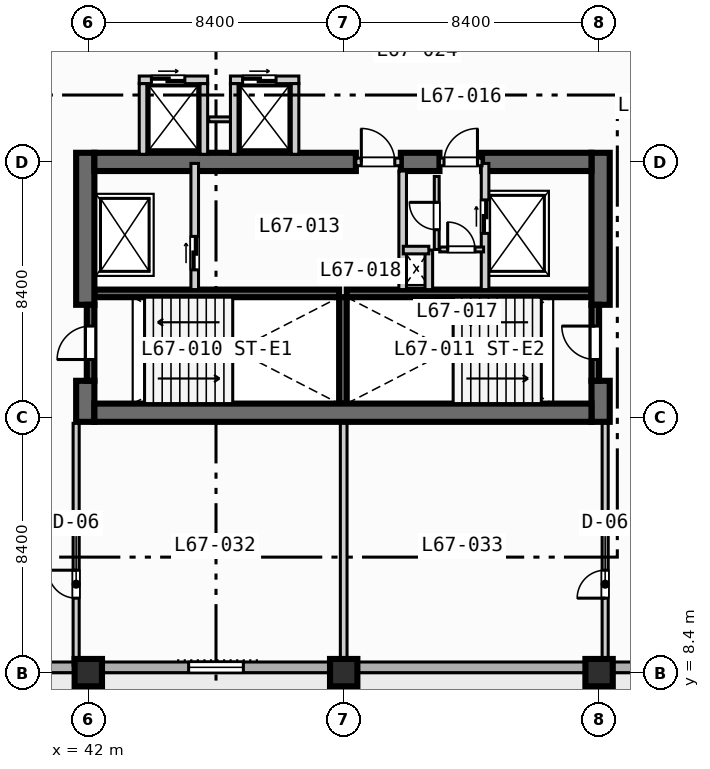
"""IFC4 building model, lengths in metres.
Left out: names, types, materials, properties, quantities, classifications, styles, units other than length and angle.
Written with IfcOpenShell. Run it as: python <this file> out.ifc"""

import sys

from ifc_helpers import new_model, si_unit, direction, frame, frame_2d, origin, origin_2d, place, context, subcontext, project, spatial, rectangle, extrude, element, fill, save


model = new_model("IFC4")
c1 = context("Model", 3, precision=1e-05, world=origin(), true_north=direction((0.0, 1.0)))
c2 = subcontext(c1, "Body", "Model", "MODEL_VIEW")
j1 = project(units=[si_unit("LENGTHUNIT", "METRE"), si_unit("PLANEANGLEUNIT", "RADIAN")], contexts=[c1])
p1 = place(None, origin())
s1 = spatial("IfcSite", under=j1, at=p1, CompositionType="ELEMENT")
p2 = place(p1, origin())
s2 = spatial("IfcBuilding", under=s1, at=p2, CompositionType="ELEMENT")
p3 = place(p2, frame((0.0, 0.0, 271.2)))
s3 = spatial("IfcBuildingStorey", under=s2, at=p3, CompositionType="ELEMENT", Elevation=271.2)
for number, where, z_axis, x_axis in (
    (1, (42.2, 20.875, 0.0), (0.0, 0.0, 1.0), (1.0, 0.0, 0.0)),
    (2, (50.5, 20.875, 0.0), (0.0, 0.0, 1.0), (1.0, 0.0, 0.0)),
):
    element("IfcWall", number, at=place(p3, frame(where, z_axis=z_axis, x_axis=x_axis)), inside=s3, PredefinedType="SOLIDWALL", context=c2, shape_type="SweptSolid", body=[
        extrude(rectangle(XDim=8.05, YDim=0.25, at=frame_2d((4.025, 0.0))), origin(), (0.0, 0.0, 1.0), 3.47),
    ])
p4 = place(p3, frame((50.375, 17.25, 0.0), z_axis=(0.0, 0.0, 1.0), x_axis=(0.0, 1.0, 0.0)))
e3 = element("IfcWall", 3, at=p4, inside=s3, PredefinedType="SOLIDWALL", context=c2, shape_type="SweptSolid", body=[
    extrude(rectangle(XDim=3.5, YDim=0.25, at=frame_2d((1.75, 0.0))), origin(), (0.0, 0.0, 1.0), 3.47),
])
p5 = place(p3, frame((41.9, 16.65, 0.0), z_axis=(0.0, 0.0, 1.0), x_axis=(0.0, 1.0, 0.0)))
e4 = element("IfcWall", 4, at=p5, inside=s3, PredefinedType="SHEAR", context=c2, shape_type="SweptSolid", body=[
    extrude(rectangle(XDim=1.35, YDim=0.6, at=frame_2d((0.675, 0.0))), origin(), (0.0, 0.0, 1.0), 3.47),
])
p6 = place(p3, frame((41.9, 20.5, 0.0), z_axis=(0.0, 0.0, 1.0), x_axis=(0.0, 1.0, 0.0)))
e5 = element("IfcWall", 5, at=p6, inside=s3, PredefinedType="SHEAR", context=c2, shape_type="SweptSolid", body=[
    extrude(rectangle(XDim=5.0, YDim=0.6, at=frame_2d((2.5, 0.0))), origin(), (0.0, 0.0, 1.0), 3.47),
])
p7 = place(p3, frame((58.85, 16.65, 0.0), z_axis=(0.0, 0.0, 1.0), x_axis=(0.0, 1.0, 0.0)))
e6 = element("IfcWall", 6, at=p7, inside=s3, PredefinedType="SHEAR", context=c2, shape_type="SweptSolid", body=[
    extrude(rectangle(XDim=1.35, YDim=0.6, at=frame_2d((0.675, 0.0))), origin(), (0.0, 0.0, 1.0), 3.47),
])
p8 = place(p3, frame((58.85, 20.5, 0.0), z_axis=(0.0, 0.0, 1.0), x_axis=(0.0, 1.0, 0.0)))
e7 = element("IfcWall", 7, at=p8, inside=s3, PredefinedType="SHEAR", context=c2, shape_type="SweptSolid", body=[
    extrude(rectangle(XDim=5.0, YDim=0.6, at=frame_2d((2.5, 0.0))), origin(), (0.0, 0.0, 1.0), 3.47),
])
p9 = place(p3, frame((42.2, 16.95, 0.0), z_axis=(0.0, 0.0, 1.0), x_axis=(1.0, 0.0, 0.0)))
e8 = element("IfcWall", 8, at=p9, inside=s3, PredefinedType="SHEAR", context=c2, shape_type="SweptSolid", body=[
    extrude(rectangle(XDim=16.35, YDim=0.6, at=frame_2d((8.175, 0.0))), origin(), (0.0, 0.0, 1.0), 3.47),
])
p10 = place(p3, frame((42.2, 25.2, 0.0), z_axis=(0.0, 0.0, 1.0), x_axis=(1.0, 0.0, 0.0)))
e9 = element("IfcWall", 9, at=p10, inside=s3, PredefinedType="SHEAR", context=c2, shape_type="SweptSolid", body=[
    extrude(rectangle(XDim=8.6, YDim=0.6, at=frame_2d((4.3, 0.0))), origin(), (0.0, 0.0, 1.0), 3.47),
])
p11 = place(p3, frame((52.28, 25.2, 0.0), z_axis=(0.0, 0.0, 1.0), x_axis=(1.0, 0.0, 0.0)))
e10 = element("IfcWall", 10, at=p11, inside=s3, PredefinedType="SHEAR", context=c2, shape_type="SweptSolid", body=[
    extrude(rectangle(XDim=1.27, YDim=0.6, at=frame_2d((0.635, 0.0))), origin(), (0.0, 0.0, 1.0), 3.47),
])
p12 = place(p3, frame((54.95, 25.2, 0.0), z_axis=(0.0, 0.0, 1.0), x_axis=(1.0, 0.0, 0.0)))
e11 = element("IfcWall", 11, at=p12, inside=s3, PredefinedType="SHEAR", context=c2, shape_type="SweptSolid", body=[
    extrude(rectangle(XDim=3.6, YDim=0.6, at=frame_2d((1.8, 0.0))), origin(), (0.0, 0.0, 1.0), 3.47),
])
for number, where, z_axis, x_axis in (
    (12, (42.0, 8.4, 0.0), (0.0, 0.0, 1.0), (1.0, 0.0, 0.0)),
    (13, (50.4, 8.4, 0.0), (0.0, 0.0, 1.0), (1.0, 0.0, 0.0)),
    (14, (58.8, 8.4, 0.0), (0.0, 0.0, 1.0), (1.0, 0.0, 0.0)),
):
    element("IfcColumn", number, at=place(p3, frame(where, z_axis=z_axis, x_axis=x_axis)), inside=s3, PredefinedType="COLUMN", context=c2, shape_type="SweptSolid", body=[
        extrude(rectangle(XDim=0.9, YDim=0.9, at=origin_2d()), origin(), (0.0, 0.0, 1.0), 3.7),
    ])
p13 = place(p3, frame((72.425, 8.575, 0.0), z_axis=(0.0, 0.0, 1.0), x_axis=(-1.0, 0.0, 0.0)))
e15 = element("IfcWall", 15, at=p13, inside=s3, PredefinedType="STANDARD", context=c2, shape_type="SweptSolid", body=[
    extrude(rectangle(XDim=60.85, YDim=0.35, at=frame_2d((30.425, 0.0))), origin(), (0.0, 0.0, 1.0), 3.47),
])
p14 = place(p13, frame((42.325, 0.0, 0.0)))
e16 = element("IfcOpeningElement", 16, at=p14, cuts=e15, PredefinedType="OPENING", context=c2, shape_type="SweptSolid", body=[
    extrude(rectangle(XDim=1.4, YDim=2.2, at=frame_2d((0.7, 1.1))), frame((0.0, 0.185, 0.0), z_axis=(0.0, -1.0, 0.0), x_axis=(1.0, 0.0, 0.0)), (0.0, 0.0, 1.0), 0.37),
])
p15 = place(p13, frame((33.425, 0.0, 0.85)))
e17 = element("IfcOpeningElement", 17, at=p15, cuts=e15, PredefinedType="OPENING", context=c2, shape_type="SweptSolid", body=[
    extrude(rectangle(XDim=2.4, YDim=1.95, at=frame_2d((1.2, 0.975))), frame((0.0, 0.185, 0.0), z_axis=(0.0, -1.0, 0.0), x_axis=(1.0, 0.0, 0.0)), (0.0, 0.0, 1.0), 0.37),
])
p16 = place(p13, frame((25.325, 0.0, 0.85)))
e18 = element("IfcOpeningElement", 18, at=p16, cuts=e15, PredefinedType="OPENING", context=c2, shape_type="SweptSolid", body=[
    extrude(rectangle(XDim=1.8, YDim=1.8, at=frame_2d((0.9, 0.9))), frame((0.0, 0.185, 0.0), z_axis=(0.0, -1.0, 0.0), x_axis=(1.0, 0.0, 0.0)), (0.0, 0.0, 1.0), 0.37),
])
p17 = place(p13, frame((50.215, 0.0, 0.85)))
e19 = element("IfcOpeningElement", 19, at=p17, cuts=e15, PredefinedType="OPENING", context=c2, shape_type="SweptSolid", body=[
    extrude(rectangle(XDim=1.8, YDim=1.8, at=frame_2d((0.9, 0.9))), frame((0.0, 0.185, 0.0), z_axis=(0.0, -1.0, 0.0), x_axis=(1.0, 0.0, 0.0)), (0.0, 0.0, 1.0), 0.37),
])
p18 = place(p13, frame((57.935, 0.0, 0.85)))
e20 = element("IfcOpeningElement", 20, at=p18, cuts=e15, PredefinedType="OPENING", context=c2, shape_type="SweptSolid", body=[
    extrude(rectangle(XDim=1.8, YDim=1.8, at=frame_2d((0.9, 0.9))), frame((0.0, 0.185, 0.0), z_axis=(0.0, -1.0, 0.0), x_axis=(1.0, 0.0, 0.0)), (0.0, 0.0, 1.0), 0.37),
])
p19 = place(p3, frame((42.075, 18.0, 0.0), z_axis=(0.0, 0.0, 1.0), x_axis=(0.0, 1.0, 0.0)))
e21 = element("IfcWall", 21, at=p19, inside=s3, PredefinedType="SOLIDWALL", context=c2, shape_type="SweptSolid", body=[
    extrude(rectangle(XDim=2.5, YDim=0.25, at=frame_2d((1.25, 0.0))), origin(), (0.0, 0.0, 1.0), 3.47),
])
p20 = place(p19, frame((0.7, 0.0, 0.0)))
e22 = element("IfcOpeningElement", 22, at=p20, cuts=e21, PredefinedType="OPENING", context=c2, shape_type="SweptSolid", body=[
    extrude(rectangle(XDim=1.1, YDim=2.15, at=frame_2d((0.55, 1.075))), frame((0.0, 0.135, 0.0), z_axis=(0.0, -1.0, 0.0), x_axis=(1.0, 0.0, 0.0)), (0.0, 0.0, 1.0), 0.27),
])
p21 = place(p3, frame((58.675, 18.0, 0.0), z_axis=(0.0, 0.0, 1.0), x_axis=(0.0, 1.0, 0.0)))
e23 = element("IfcWall", 23, at=p21, inside=s3, PredefinedType="SOLIDWALL", context=c2, shape_type="SweptSolid", body=[
    extrude(rectangle(XDim=2.5, YDim=0.25, at=frame_2d((1.25, 0.0))), origin(), (0.0, 0.0, 1.0), 3.47),
])
p22 = place(p21, frame((0.7, 0.0, 0.0)))
e24 = element("IfcOpeningElement", 24, at=p22, cuts=e23, PredefinedType="OPENING", context=c2, shape_type="SweptSolid", body=[
    extrude(rectangle(XDim=1.1, YDim=2.15, at=frame_2d((0.55, 1.075))), frame((0.0, 0.135, 0.0), z_axis=(0.0, -1.0, 0.0), x_axis=(1.0, 0.0, 0.0)), (0.0, 0.0, 1.0), 0.27),
])
p23 = place(p3, frame((45.5, 21.0, 0.0), z_axis=(0.0, 0.0, 1.0), x_axis=(0.0, 1.0, 0.0)))
e25 = element("IfcWall", 25, at=p23, inside=s3, PredefinedType="SOLIDWALL", context=c2, shape_type="SweptSolid", body=[
    extrude(rectangle(XDim=4.15, YDim=0.25, at=frame_2d((2.075, 0.0))), origin(), (0.0, 0.0, 1.0), 3.47),
])
p24 = place(p23, frame((0.65, 0.0, 0.0)))
e26 = element("IfcOpeningElement", 26, at=p24, cuts=e25, PredefinedType="OPENING", context=c2, shape_type="SweptSolid", body=[
    extrude(rectangle(XDim=1.1, YDim=2.15, at=frame_2d((0.55, 1.075))), frame((0.0, 0.135, 0.0), z_axis=(0.0, -1.0, 0.0), x_axis=(1.0, 0.0, 0.0)), (0.0, 0.0, 1.0), 0.27),
])
p25 = place(p3, frame((50.8, 25.2, 0.0), z_axis=(0.0, 0.0, 1.0), x_axis=(1.0, 0.0, 0.0)))
e27 = element("IfcWall", 27, at=p25, inside=s3, PredefinedType="SOLIDWALL", context=c2, shape_type="SweptSolid", body=[
    extrude(rectangle(XDim=1.48, YDim=0.25, at=frame_2d((0.74, 0.0))), origin(), (0.0, 0.0, 1.0), 3.47),
])
p26 = place(p25, frame((0.18, 0.0, 0.0)))
e28 = element("IfcOpeningElement", 28, at=p26, cuts=e27, PredefinedType="OPENING", context=c2, shape_type="SweptSolid", body=[
    extrude(rectangle(XDim=1.1, YDim=2.15, at=frame_2d((0.55, 1.075))), frame((0.0, 0.135, 0.0), z_axis=(0.0, -1.0, 0.0), x_axis=(1.0, 0.0, 0.0)), (0.0, 0.0, 1.0), 0.27),
])
p27 = place(p3, frame((52.34, 21.0, 0.0), z_axis=(0.0, 0.0, 1.0), x_axis=(0.0, 1.0, 0.0)))
e29 = element("IfcWall", 29, at=p27, inside=s3, PredefinedType="SOLIDWALL", context=c2, shape_type="SweptSolid", body=[
    extrude(rectangle(XDim=3.9, YDim=0.25, at=frame_2d((1.95, 0.0))), origin(), (0.0, 0.0, 1.0), 3.47),
])
p28 = place(p3, frame((55.05, 21.0, 0.0), z_axis=(0.0, 0.0, 1.0), x_axis=(0.0, 1.0, 0.0)))
e30 = element("IfcWall", 30, at=p28, inside=s3, PredefinedType="SOLIDWALL", context=c2, shape_type="SweptSolid", body=[
    extrude(rectangle(XDim=4.15, YDim=0.25, at=frame_2d((2.075, 0.0))), origin(), (0.0, 0.0, 1.0), 3.47),
])
p29 = place(p28, frame((1.85, 0.0, 0.0)))
e31 = element("IfcOpeningElement", 31, at=p29, cuts=e30, PredefinedType="OPENING", context=c2, shape_type="SweptSolid", body=[
    extrude(rectangle(XDim=1.1, YDim=2.15, at=frame_2d((0.55, 1.075))), frame((0.0, 0.135, 0.0), z_axis=(0.0, -1.0, 0.0), x_axis=(1.0, 0.0, 0.0)), (0.0, 0.0, 1.0), 0.27),
])
p30 = place(p3, frame((53.55, 25.2, 0.0), z_axis=(0.0, 0.0, 1.0), x_axis=(1.0, 0.0, 0.0)))
e32 = element("IfcWall", 32, at=p30, inside=s3, PredefinedType="SOLIDWALL", context=c2, shape_type="SweptSolid", body=[
    extrude(rectangle(XDim=1.4, YDim=0.25, at=frame_2d((0.7, 0.0))), origin(), (0.0, 0.0, 1.0), 3.47),
])
p31 = place(p30, frame((0.15, 0.0, 0.0)))
e33 = element("IfcOpeningElement", 33, at=p31, cuts=e32, PredefinedType="OPENING", context=c2, shape_type="SweptSolid", body=[
    extrude(rectangle(XDim=1.1, YDim=2.15, at=frame_2d((0.55, 1.075))), frame((0.0, 0.135, 0.0), z_axis=(0.0, -1.0, 0.0), x_axis=(1.0, 0.0, 0.0)), (0.0, 0.0, 1.0), 0.27),
])
p32 = place(p3, frame((53.2, 21.0, 0.0), z_axis=(0.0, 0.0, 1.0), x_axis=(0.0, 1.0, 0.0)))
e34 = element("IfcWall", 34, at=p32, inside=s3, PredefinedType="SOLIDWALL", context=c2, shape_type="SweptSolid", body=[
    extrude(rectangle(XDim=1.3, YDim=0.25, at=frame_2d((0.65, 0.0))), origin(), (0.0, 0.0, 1.0), 3.47),
])
p33 = place(p3, frame((52.36, 22.3, 0.0), z_axis=(0.0, 0.0, 1.0), x_axis=(1.0, 0.0, 0.0)))
e35 = element("IfcWall", 35, at=p33, inside=s3, PredefinedType="SOLIDWALL", context=c2, shape_type="SweptSolid", body=[
    extrude(rectangle(XDim=0.84, YDim=0.25, at=frame_2d((0.42, 0.0))), origin(), (0.0, 0.0, 1.0), 3.47),
])
p34 = place(p3, frame((53.56, 22.32, 0.0), z_axis=(0.0, 0.0, 1.0), x_axis=(1.0, 0.0, 0.0)))
e36 = element("IfcWall", 36, at=p34, inside=s3, PredefinedType="PARTITIONING", context=c2, shape_type="SweptSolid", body=[
    extrude(rectangle(XDim=1.44, YDim=0.16, at=frame_2d((0.72, 0.0))), origin(), (0.0, 0.0, 1.0), 3.47),
])
p35 = place(p34, frame((0.26, 0.0, 0.0)))
e37 = element("IfcOpeningElement", 37, at=p35, cuts=e36, PredefinedType="OPENING", context=c2, shape_type="SweptSolid", body=[
    extrude(rectangle(XDim=0.9, YDim=2.1, at=frame_2d((0.45, 1.05))), frame((0.0, 0.09, 0.0), z_axis=(0.0, -1.0, 0.0), x_axis=(1.0, 0.0, 0.0)), (0.0, 0.0, 1.0), 0.18),
])
p36 = place(p3, frame((53.46, 22.32, 0.0), z_axis=(0.0, 0.0, 1.0), x_axis=(0.0, 1.0, 0.0)))
e38 = element("IfcWall", 38, at=p36, inside=s3, PredefinedType="PARTITIONING", context=c2, shape_type="SweptSolid", body=[
    extrude(rectangle(XDim=2.4, YDim=0.16, at=frame_2d((1.2, 0.0))), origin(), (0.0, 0.0, 1.0), 3.47),
])
p37 = place(p36, frame((0.65, 0.0, 0.0)))
e39 = element("IfcOpeningElement", 39, at=p37, cuts=e38, PredefinedType="OPENING", context=c2, shape_type="SweptSolid", body=[
    extrude(rectangle(XDim=0.9, YDim=2.1, at=frame_2d((0.45, 1.05))), frame((0.0, 0.09, 0.0), z_axis=(0.0, -1.0, 0.0), x_axis=(1.0, 0.0, 0.0)), (0.0, 0.0, 1.0), 0.18),
])
p38 = place(p3, frame((43.675, 27.9, 0.0), z_axis=(0.0, 0.0, 1.0), x_axis=(1.0, 0.0, 0.0)))
e40 = element("IfcWall", 40, at=p38, inside=s3, PredefinedType="SOLIDWALL", context=c2, shape_type="SweptSolid", body=[
    extrude(rectangle(XDim=2.25, YDim=0.25, at=frame_2d((1.125, 0.0))), origin(), (0.0, 0.0, 1.0), 3.47),
])
p39 = place(p38, frame((0.4, 0.0, 0.0)))
e41 = element("IfcOpeningElement", 41, at=p39, cuts=e40, PredefinedType="OPENING", context=c2, shape_type="SweptSolid", body=[
    extrude(rectangle(XDim=1.1, YDim=2.15, at=frame_2d((0.55, 1.075))), frame((0.0, 0.135, 0.0), z_axis=(0.0, -1.0, 0.0), x_axis=(1.0, 0.0, 0.0)), (0.0, 0.0, 1.0), 0.27),
])
for number, where, z_axis, x_axis in (
    (42, (43.8, 25.45, 0.0), (0.0, 0.0, 1.0), (0.0, 1.0, 0.0)),
    (43, (45.8, 25.45, 0.0), (0.0, 0.0, 1.0), (0.0, 1.0, 0.0)),
):
    element("IfcWall", number, at=place(p3, frame(where, z_axis=z_axis, x_axis=x_axis)), inside=s3, PredefinedType="SOLIDWALL", context=c2, shape_type="SweptSolid", body=[
        extrude(rectangle(XDim=2.325, YDim=0.25, at=frame_2d((1.163, 0.0))), origin(), (0.0, 0.0, 1.0), 3.47),
    ])
p40 = place(p3, frame((45.96, 26.6, 0.0), z_axis=(0.0, 0.0, 1.0), x_axis=(1.0, 0.0, 0.0)))
e44 = element("IfcWall", 44, at=p40, inside=s3, PredefinedType="PARTITIONING", context=c2, shape_type="SweptSolid", body=[
    extrude(rectangle(XDim=0.88, YDim=0.16, at=frame_2d((0.44, 0.0))), origin(), (0.0, 0.0, 1.0), 3.47),
])
p41 = place(p3, frame((46.675, 27.9, 0.0), z_axis=(0.0, 0.0, 1.0), x_axis=(1.0, 0.0, 0.0)))
e45 = element("IfcWall", 45, at=p41, inside=s3, PredefinedType="SOLIDWALL", context=c2, shape_type="SweptSolid", body=[
    extrude(rectangle(XDim=2.25, YDim=0.25, at=frame_2d((1.125, 0.0))), origin(), (0.0, 0.0, 1.0), 3.47),
])
p42 = place(p41, frame((0.4, 0.0, 0.0)))
e46 = element("IfcOpeningElement", 46, at=p42, cuts=e45, PredefinedType="OPENING", context=c2, shape_type="SweptSolid", body=[
    extrude(rectangle(XDim=1.1, YDim=2.15, at=frame_2d((0.55, 1.075))), frame((0.0, 0.135, 0.0), z_axis=(0.0, -1.0, 0.0), x_axis=(1.0, 0.0, 0.0)), (0.0, 0.0, 1.0), 0.27),
])
for number, where, z_axis, x_axis in (
    (47, (46.8, 25.45, 0.0), (0.0, 0.0, 1.0), (0.0, 1.0, 0.0)),
    (48, (48.8, 25.45, 0.0), (0.0, 0.0, 1.0), (0.0, 1.0, 0.0)),
):
    element("IfcWall", number, at=place(p3, frame(where, z_axis=z_axis, x_axis=x_axis)), inside=s3, PredefinedType="SOLIDWALL", context=c2, shape_type="SweptSolid", body=[
        extrude(rectangle(XDim=2.325, YDim=0.25, at=frame_2d((1.163, 0.0))), origin(), (0.0, 0.0, 1.0), 3.47),
    ])
p43 = place(p3, frame((41.6, 8.65, 0.0), z_axis=(0.0, 0.0, 1.0), x_axis=(0.0, 1.0, 0.0)))
e49 = element("IfcWall", 49, at=p43, inside=s3, PredefinedType="PARTITIONING", context=c2, shape_type="SweptSolid", body=[
    extrude(rectangle(XDim=7.95, YDim=0.2, at=frame_2d((3.975, 0.0))), origin(), (0.0, 0.0, 1.0), 3.47),
])
p44 = place(p43, frame((2.2, 0.0, 0.0)))
e50 = element("IfcOpeningElement", 50, at=p44, cuts=e49, PredefinedType="OPENING", context=c2, shape_type="SweptSolid", body=[
    extrude(rectangle(XDim=0.92, YDim=2.1, at=frame_2d((0.46, 1.05))), frame((0.0, 0.11, 0.0), z_axis=(0.0, -1.0, 0.0), x_axis=(1.0, 0.0, 0.0)), (0.0, 0.0, 1.0), 0.22),
])
p45 = place(p3, frame((59.0, 8.65, 0.0), z_axis=(0.0, 0.0, 1.0), x_axis=(0.0, 1.0, 0.0)))
e51 = element("IfcWall", 51, at=p45, inside=s3, PredefinedType="PARTITIONING", context=c2, shape_type="SweptSolid", body=[
    extrude(rectangle(XDim=7.95, YDim=0.2, at=frame_2d((3.975, 0.0))), origin(), (0.0, 0.0, 1.0), 2.82),
])
p46 = place(p45, frame((2.2, 0.0, 0.0)))
e52 = element("IfcOpeningElement", 52, at=p46, cuts=e51, PredefinedType="OPENING", context=c2, shape_type="SweptSolid", body=[
    extrude(rectangle(XDim=0.92, YDim=2.1, at=frame_2d((0.46, 1.05))), frame((0.0, 0.11, 0.0), z_axis=(0.0, -1.0, 0.0), x_axis=(1.0, 0.0, 0.0)), (0.0, 0.0, 1.0), 0.22),
])
p47 = place(p3, frame((50.4, 8.65, 0.0), z_axis=(0.0, 0.0, 1.0), x_axis=(0.0, 1.0, 0.0)))
e53 = element("IfcWall", 53, at=p47, inside=s3, PredefinedType="PARTITIONING", context=c2, shape_type="SweptSolid", body=[
    extrude(rectangle(XDim=7.95, YDim=0.22, at=frame_2d((3.975, 0.0))), origin(), (0.0, 0.0, 1.0), 3.053),
])
p48 = place(p16, origin())
e54 = element("IfcWindow", 54, at=p48, inside=s3, PartitioningType="SINGLE_PANEL", PredefinedType="WINDOW", context=c2, shape_type="SweptSolid", body=[
    extrude(rectangle(XDim=1.8, YDim=1.8, at=frame_2d((0.9, 0.9))), frame((0.0, 0.03, 0.0), z_axis=(0.0, -1.0, 0.0), x_axis=(1.0, 0.0, 0.0)), (0.0, 0.0, 1.0), 0.06),
])
fill(e18, e54)
p49 = place(p20, origin())
e55 = element("IfcDoor", 55, at=p49, inside=s3, OperationType="SINGLE_SWING_LEFT", PredefinedType="DOOR", context=c2, shape_type="SweptSolid", body=[
    extrude(rectangle(XDim=1.1, YDim=2.15, at=frame_2d((0.55, 1.075))), frame((0.0, 0.025, 0.0), z_axis=(0.0, -1.0, 0.0), x_axis=(1.0, 0.0, 0.0)), (0.0, 0.0, 1.0), 0.05),
])
fill(e22, e55)
p50 = place(p22, origin())
e56 = element("IfcDoor", 56, at=p50, inside=s3, OperationType="SINGLE_SWING_RIGHT", PredefinedType="DOOR", context=c2, shape_type="SweptSolid", body=[
    extrude(rectangle(XDim=1.1, YDim=2.15, at=frame_2d((0.55, 1.075))), frame((0.0, 0.025, 0.0), z_axis=(0.0, -1.0, 0.0), x_axis=(1.0, 0.0, 0.0)), (0.0, 0.0, 1.0), 0.05),
])
fill(e24, e56)
p51 = place(p24, origin())
e57 = element("IfcDoor", 57, at=p51, inside=s3, OperationType="SLIDING_TO_LEFT", PredefinedType="DOOR", context=c2, shape_type="SweptSolid", body=[
    extrude(rectangle(XDim=1.1, YDim=2.15, at=frame_2d((0.55, 1.075))), frame((0.0, 0.025, 0.0), z_axis=(0.0, -1.0, 0.0), x_axis=(1.0, 0.0, 0.0)), (0.0, 0.0, 1.0), 0.05),
])
fill(e26, e57)
p52 = place(p26, origin())
e58 = element("IfcDoor", 58, at=p52, inside=s3, OperationType="SINGLE_SWING_LEFT", PredefinedType="DOOR", context=c2, shape_type="SweptSolid", body=[
    extrude(rectangle(XDim=1.1, YDim=2.15, at=frame_2d((0.55, 1.075))), frame((0.0, 0.025, 0.0), z_axis=(0.0, -1.0, 0.0), x_axis=(1.0, 0.0, 0.0)), (0.0, 0.0, 1.0), 0.05),
])
fill(e28, e58)
p53 = place(p29, origin())
e59 = element("IfcDoor", 59, at=p53, inside=s3, OperationType="SLIDING_TO_LEFT", PredefinedType="DOOR", context=c2, shape_type="SweptSolid", body=[
    extrude(rectangle(XDim=1.1, YDim=2.15, at=frame_2d((0.55, 1.075))), frame((0.0, 0.025, 0.0), z_axis=(0.0, -1.0, 0.0), x_axis=(1.0, 0.0, 0.0)), (0.0, 0.0, 1.0), 0.05),
])
fill(e31, e59)
p54 = place(p31, origin())
e60 = element("IfcDoor", 60, at=p54, inside=s3, OperationType="SINGLE_SWING_RIGHT", PredefinedType="DOOR", context=c2, shape_type="SweptSolid", body=[
    extrude(rectangle(XDim=1.1, YDim=2.15, at=frame_2d((0.55, 1.075))), frame((0.0, 0.025, 0.0), z_axis=(0.0, -1.0, 0.0), x_axis=(1.0, 0.0, 0.0)), (0.0, 0.0, 1.0), 0.05),
])
fill(e33, e60)
p55 = place(p35, origin())
e61 = element("IfcDoor", 61, at=p55, inside=s3, OperationType="SINGLE_SWING_LEFT", PredefinedType="DOOR", context=c2, shape_type="SweptSolid", body=[
    extrude(rectangle(XDim=0.9, YDim=2.1, at=frame_2d((0.45, 1.05))), frame((0.0, 0.025, 0.0), z_axis=(0.0, -1.0, 0.0), x_axis=(1.0, 0.0, 0.0)), (0.0, 0.0, 1.0), 0.05),
])
fill(e37, e61)
p56 = place(p37, origin())
e62 = element("IfcDoor", 62, at=p56, inside=s3, OperationType="SINGLE_SWING_RIGHT", PredefinedType="DOOR", context=c2, shape_type="SweptSolid", body=[
    extrude(rectangle(XDim=0.9, YDim=2.1, at=frame_2d((0.45, 1.05))), frame((0.0, 0.025, 0.0), z_axis=(0.0, -1.0, 0.0), x_axis=(1.0, 0.0, 0.0)), (0.0, 0.0, 1.0), 0.05),
])
fill(e39, e62)
p57 = place(p39, origin())
e63 = element("IfcDoor", 63, at=p57, inside=s3, OperationType="SLIDING_TO_LEFT", PredefinedType="DOOR", context=c2, shape_type="SweptSolid", body=[
    extrude(rectangle(XDim=1.1, YDim=2.15, at=frame_2d((0.55, 1.075))), frame((0.0, 0.025, 0.0), z_axis=(0.0, -1.0, 0.0), x_axis=(1.0, 0.0, 0.0)), (0.0, 0.0, 1.0), 0.05),
])
fill(e41, e63)
p58 = place(p42, origin())
e64 = element("IfcDoor", 64, at=p58, inside=s3, OperationType="SLIDING_TO_LEFT", PredefinedType="DOOR", context=c2, shape_type="SweptSolid", body=[
    extrude(rectangle(XDim=1.1, YDim=2.15, at=frame_2d((0.55, 1.075))), frame((0.0, 0.025, 0.0), z_axis=(0.0, -1.0, 0.0), x_axis=(1.0, 0.0, 0.0)), (0.0, 0.0, 1.0), 0.05),
])
fill(e46, e64)
p59 = place(p44, origin())
e65 = element("IfcDoor", 65, at=p59, inside=s3, OperationType="SINGLE_SWING_RIGHT", PredefinedType="DOOR", context=c2, shape_type="SweptSolid", body=[
    extrude(rectangle(XDim=0.92, YDim=2.1, at=frame_2d((0.46, 1.05))), frame((0.0, 0.025, 0.0), z_axis=(0.0, -1.0, 0.0), x_axis=(1.0, 0.0, 0.0)), (0.0, 0.0, 1.0), 0.05),
])
fill(e50, e65)
p60 = place(p46, origin())
e66 = element("IfcDoor", 66, at=p60, inside=s3, OperationType="SINGLE_SWING_LEFT", PredefinedType="DOOR", context=c2, shape_type="SweptSolid", body=[
    extrude(rectangle(XDim=0.92, YDim=2.1, at=frame_2d((0.46, 1.05))), frame((0.0, 0.025, 0.0), z_axis=(0.0, -1.0, 0.0), x_axis=(1.0, 0.0, 0.0)), (0.0, 0.0, 1.0), 0.05),
])
fill(e52, e66)
save(model, sys.argv[1])
